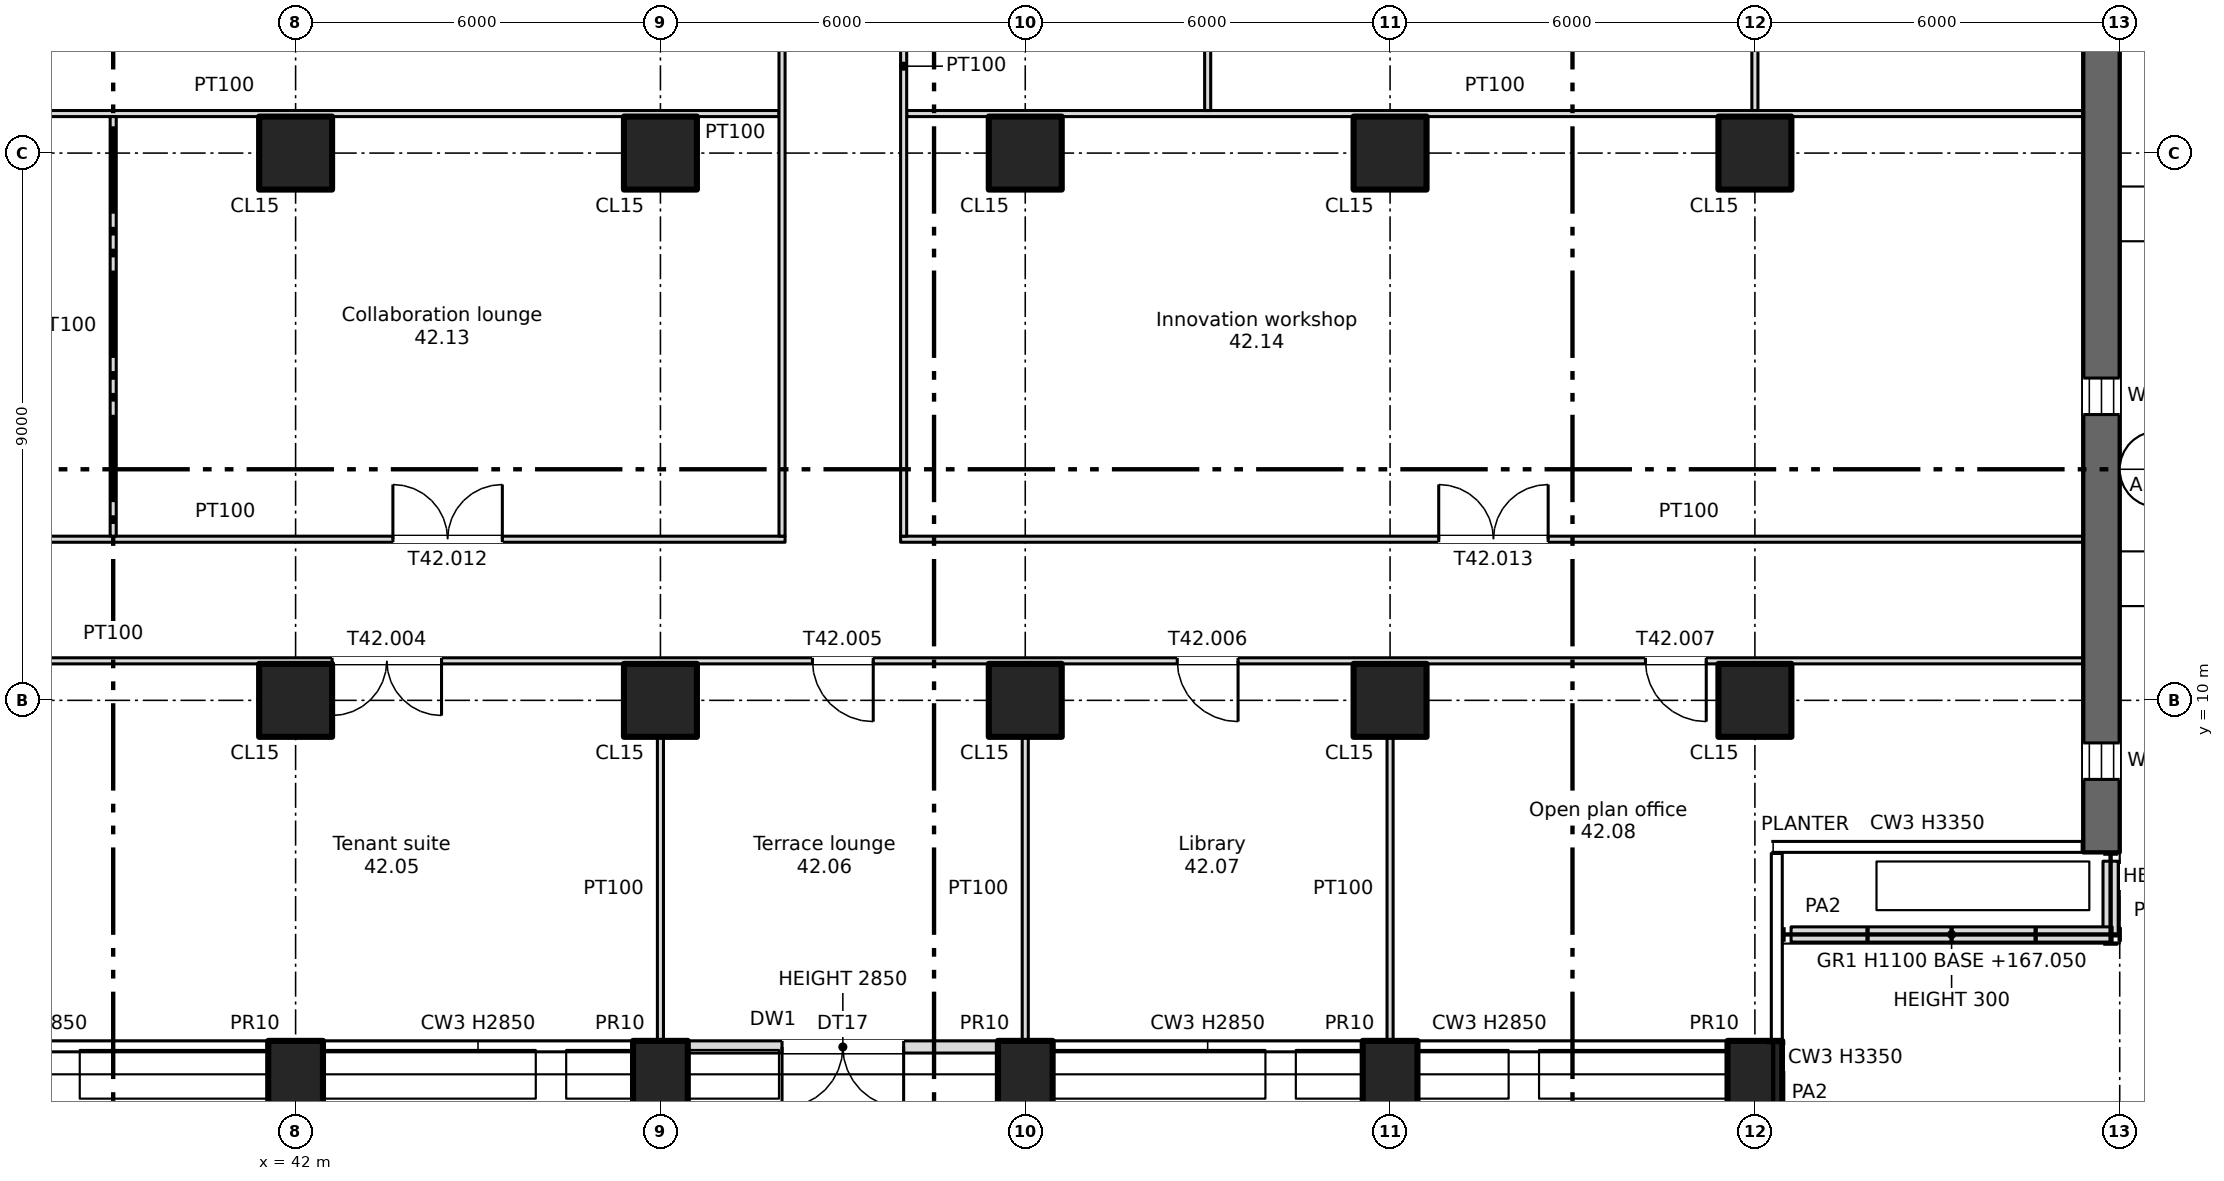
"""IFC4 building model, lengths in metres.
Left out: names, types, materials, properties, quantities, classifications, styles, units other than length and angle.
Written with IfcOpenShell. Run it as: python <this file> out.ifc"""

import sys

from ifc_helpers import new_model, si_unit, direction, frame, frame_2d, origin, origin_2d, place, context, subcontext, project, spatial, rectangle, extrude, element, fill, save


model = new_model("IFC4")
c1 = context("Model", 3, precision=1e-05, world=origin(), true_north=direction((0.0, 1.0)))
c2 = subcontext(c1, "Body", "Model", "MODEL_VIEW")
j1 = project(units=[si_unit("LENGTHUNIT", "METRE"), si_unit("PLANEANGLEUNIT", "RADIAN")], contexts=[c1])
p1 = place(None, origin())
s1 = spatial("IfcSite", under=j1, at=p1, CompositionType="ELEMENT")
p2 = place(p1, origin())
s2 = spatial("IfcBuilding", under=s1, at=p2, CompositionType="ELEMENT")
p3 = place(p2, frame((0.0, 0.0, 166.75)))
s3 = spatial("IfcBuildingStorey", under=s2, at=p3, CompositionType="ELEMENT", Elevation=166.75)
for number, where, z_axis, x_axis in (
    (1, (42.0, 3.7, 0.0), (0.0, 0.0, 1.0), (1.0, 0.0, 0.0)),
    (2, (48.0, 3.7, 0.0), (0.0, 0.0, 1.0), (1.0, 0.0, 0.0)),
    (3, (54.0, 3.7, 0.0), (0.0, 0.0, 1.0), (1.0, 0.0, 0.0)),
    (4, (60.0, 3.7, 0.0), (0.0, 0.0, 1.0), (1.0, 0.0, 0.0)),
    (5, (66.0, 3.7, 0.0), (0.0, 0.0, 1.0), (1.0, 0.0, 0.0)),
):
    element("IfcColumn", number, at=place(p3, frame(where, z_axis=z_axis, x_axis=x_axis)), inside=s3, PredefinedType="COLUMN", context=c2, shape_type="SweptSolid", body=[
        extrude(rectangle(XDim=0.9, YDim=1.4, at=origin_2d()), origin(), (0.0, 0.0, 1.0), 3.35),
    ])
for number, where, z_axis, x_axis in (
    (6, (42.0, 10.0, 0.0), (0.0, 0.0, 1.0), (1.0, 0.0, 0.0)),
    (7, (42.0, 19.0, 0.0), (0.0, 0.0, 1.0), (1.0, 0.0, 0.0)),
    (8, (48.0, 10.0, 0.0), (0.0, 0.0, 1.0), (1.0, 0.0, 0.0)),
    (9, (48.0, 19.0, 0.0), (0.0, 0.0, 1.0), (1.0, 0.0, 0.0)),
    (10, (54.0, 10.0, 0.0), (0.0, 0.0, 1.0), (1.0, 0.0, 0.0)),
    (11, (54.0, 19.0, 0.0), (0.0, 0.0, 1.0), (1.0, 0.0, 0.0)),
    (12, (60.0, 10.0, 0.0), (0.0, 0.0, 1.0), (1.0, 0.0, 0.0)),
    (13, (60.0, 19.0, 0.0), (0.0, 0.0, 1.0), (1.0, 0.0, 0.0)),
    (14, (66.0, 10.0, 0.0), (0.0, 0.0, 1.0), (1.0, 0.0, 0.0)),
    (15, (66.0, 19.0, 0.0), (0.0, 0.0, 1.0), (1.0, 0.0, 0.0)),
):
    element("IfcColumn", number, at=place(p3, frame(where, z_axis=z_axis, x_axis=x_axis)), inside=s3, PredefinedType="COLUMN", context=c2, shape_type="SweptSolid", body=[
        extrude(rectangle(XDim=1.2, YDim=1.2, at=origin_2d()), origin(), (0.0, 0.0, 1.0), 3.35),
    ])
p4 = place(p3, frame((71.7, 7.5, 0.0), z_axis=(0.0, 0.0, 1.0), x_axis=(0.0, 1.0, 0.0)))
e16 = element("IfcWall", 16, at=p4, inside=s3, PredefinedType="SHEAR", context=c2, shape_type="SweptSolid", body=[
    extrude(rectangle(XDim=34.0, YDim=0.6, at=frame_2d((17.0, 0.0))), origin(), (0.0, 0.0, 1.0), 3.35),
])
p5 = place(p4, frame((1.2, 0.0, 0.6)))
e17 = element("IfcOpeningElement", 17, at=p5, cuts=e16, PredefinedType="OPENING", context=c2, shape_type="SweptSolid", body=[
    extrude(rectangle(XDim=0.6, YDim=2.4, at=frame_2d((0.3, 1.2))), frame((0.0, 0.31, 0.0), z_axis=(0.0, -1.0, 0.0), x_axis=(1.0, 0.0, 0.0)), (0.0, 0.0, 1.0), 0.62),
])
p6 = place(p4, frame((7.2, 0.0, 0.6)))
e18 = element("IfcOpeningElement", 18, at=p6, cuts=e16, PredefinedType="OPENING", context=c2, shape_type="SweptSolid", body=[
    extrude(rectangle(XDim=0.6, YDim=2.4, at=frame_2d((0.3, 1.2))), frame((0.0, 0.31, 0.0), z_axis=(0.0, -1.0, 0.0), x_axis=(1.0, 0.0, 0.0)), (0.0, 0.0, 1.0), 0.62),
])
p7 = place(p4, frame((13.2, 0.0, 0.6)))
e19 = element("IfcOpeningElement", 19, at=p7, cuts=e16, PredefinedType="OPENING", context=c2, shape_type="SweptSolid", body=[
    extrude(rectangle(XDim=0.6, YDim=2.4, at=frame_2d((0.3, 1.2))), frame((0.0, 0.31, 0.0), z_axis=(0.0, -1.0, 0.0), x_axis=(1.0, 0.0, 0.0)), (0.0, 0.0, 1.0), 0.62),
])
p8 = place(p4, frame((19.2, 0.0, 0.6)))
e20 = element("IfcOpeningElement", 20, at=p8, cuts=e16, PredefinedType="OPENING", context=c2, shape_type="SweptSolid", body=[
    extrude(rectangle(XDim=0.6, YDim=2.4, at=frame_2d((0.3, 1.2))), frame((0.0, 0.31, 0.0), z_axis=(0.0, -1.0, 0.0), x_axis=(1.0, 0.0, 0.0)), (0.0, 0.0, 1.0), 0.62),
])
p9 = place(p4, frame((25.2, 0.0, 0.6)))
e21 = element("IfcOpeningElement", 21, at=p9, cuts=e16, PredefinedType="OPENING", context=c2, shape_type="SweptSolid", body=[
    extrude(rectangle(XDim=0.6, YDim=2.4, at=frame_2d((0.3, 1.2))), frame((0.0, 0.31, 0.0), z_axis=(0.0, -1.0, 0.0), x_axis=(1.0, 0.0, 0.0)), (0.0, 0.0, 1.0), 0.62),
])
p10 = place(p4, frame((31.2, 0.0, 0.6)))
e22 = element("IfcOpeningElement", 22, at=p10, cuts=e16, PredefinedType="OPENING", context=c2, shape_type="SweptSolid", body=[
    extrude(rectangle(XDim=0.6, YDim=2.4, at=frame_2d((0.3, 1.2))), frame((0.0, 0.31, 0.0), z_axis=(0.0, -1.0, 0.0), x_axis=(1.0, 0.0, 0.0)), (0.0, 0.0, 1.0), 0.62),
])
p11 = place(p3, frame((48.45, 4.3, 0.0), z_axis=(0.0, 0.0, 1.0), x_axis=(1.0, 0.0, 0.0)))
e23 = element("IfcWall", 23, at=p11, inside=s3, PredefinedType="SOLIDWALL", context=c2, shape_type="SweptSolid", body=[
    extrude(rectangle(XDim=5.1, YDim=0.2, at=frame_2d((2.55, 0.0))), origin(), (0.0, 0.0, 1.0), 2.85),
])
p12 = place(p11, frame((1.55, 0.0, 0.0)))
e24 = element("IfcOpeningElement", 24, at=p12, cuts=e23, PredefinedType="OPENING", context=c2, shape_type="SweptSolid", body=[
    extrude(rectangle(XDim=2.0, YDim=2.4, at=frame_2d((1.0, 1.2))), frame((0.0, 0.11, 0.0), z_axis=(0.0, -1.0, 0.0), x_axis=(1.0, 0.0, 0.0)), (0.0, 0.0, 1.0), 0.22),
])
p13 = place(p3, frame((71.85, 7.355, 0.0), z_axis=(0.0, 0.0, 1.0), x_axis=(0.0, -1.0, 0.0)))
e25 = element("IfcWall", 25, at=p13, inside=s3, PredefinedType="PARAPET", context=c2, shape_type="SweptSolid", body=[
    extrude(rectangle(XDim=1.23, YDim=0.25, at=frame_2d((0.615, 0.0))), origin(), (0.0, 0.0, 1.0), 0.3),
])
p14 = place(p3, frame((71.875, 6.15, 0.0), z_axis=(0.0, 0.0, 1.0), x_axis=(-1.0, 0.0, 0.0)))
e26 = element("IfcWall", 26, at=p14, inside=s3, PredefinedType="PARAPET", context=c2, shape_type="SweptSolid", body=[
    extrude(rectangle(XDim=5.28, YDim=0.25, at=frame_2d((2.64, 0.0))), origin(), (0.0, 0.0, 1.0), 0.3),
])
p15 = place(p3, frame((66.3, 4.255, 0.0), z_axis=(0.0, 0.0, 1.0), x_axis=(0.0, -1.0, 0.0)))
e27 = element("IfcWall", 27, at=p15, inside=s3, PredefinedType="PARAPET", context=c2, shape_type="SweptSolid", body=[
    extrude(rectangle(XDim=1.23, YDim=0.25, at=frame_2d((0.615, 0.0))), origin(), (0.0, 0.0, 1.0), 0.3),
])
p16 = place(p3, frame((6.6, 10.65, 0.0), z_axis=(0.0, 0.0, 1.0), x_axis=(1.0, 0.0, 0.0)))
e28 = element("IfcWall", 28, at=p16, inside=s3, PredefinedType="PARTITIONING", context=c2, shape_type="SweptSolid", body=[
    extrude(rectangle(XDim=64.8, YDim=0.1, at=frame_2d((32.4, 0.0))), origin(), (0.0, 0.0, 1.0), 3.35),
])
p17 = place(p16, frame((12.4, 0.0, 0.0)))
e29 = element("IfcOpeningElement", 29, at=p17, cuts=e28, PredefinedType="OPENING", context=c2, shape_type="SweptSolid", body=[
    extrude(rectangle(XDim=1.0, YDim=2.1, at=frame_2d((0.5, 1.05))), frame((0.0, 0.06, 0.0), z_axis=(0.0, -1.0, 0.0), x_axis=(1.0, 0.0, 0.0)), (0.0, 0.0, 1.0), 0.12),
])
p18 = place(p16, frame((19.9, 0.0, 0.0)))
e30 = element("IfcOpeningElement", 30, at=p18, cuts=e28, PredefinedType="OPENING", context=c2, shape_type="SweptSolid", body=[
    extrude(rectangle(XDim=1.0, YDim=2.1, at=frame_2d((0.5, 1.05))), frame((0.0, 0.06, 0.0), z_axis=(0.0, -1.0, 0.0), x_axis=(1.0, 0.0, 0.0)), (0.0, 0.0, 1.0), 0.12),
])
p19 = place(p16, frame((25.9, 0.0, 0.0)))
e31 = element("IfcOpeningElement", 31, at=p19, cuts=e28, PredefinedType="OPENING", context=c2, shape_type="SweptSolid", body=[
    extrude(rectangle(XDim=1.0, YDim=2.1, at=frame_2d((0.5, 1.05))), frame((0.0, 0.06, 0.0), z_axis=(0.0, -1.0, 0.0), x_axis=(1.0, 0.0, 0.0)), (0.0, 0.0, 1.0), 0.12),
])
p20 = place(p16, frame((36.0, 0.0, 0.0)))
e32 = element("IfcOpeningElement", 32, at=p20, cuts=e28, PredefinedType="OPENING", context=c2, shape_type="SweptSolid", body=[
    extrude(rectangle(XDim=1.8, YDim=2.1, at=frame_2d((0.9, 1.05))), frame((0.0, 0.06, 0.0), z_axis=(0.0, -1.0, 0.0), x_axis=(1.0, 0.0, 0.0)), (0.0, 0.0, 1.0), 0.12),
])
p21 = place(p16, frame((43.9, 0.0, 0.0)))
e33 = element("IfcOpeningElement", 33, at=p21, cuts=e28, PredefinedType="OPENING", context=c2, shape_type="SweptSolid", body=[
    extrude(rectangle(XDim=1.0, YDim=2.1, at=frame_2d((0.5, 1.05))), frame((0.0, 0.06, 0.0), z_axis=(0.0, -1.0, 0.0), x_axis=(1.0, 0.0, 0.0)), (0.0, 0.0, 1.0), 0.12),
])
p22 = place(p16, frame((49.9, 0.0, 0.0)))
e34 = element("IfcOpeningElement", 34, at=p22, cuts=e28, PredefinedType="OPENING", context=c2, shape_type="SweptSolid", body=[
    extrude(rectangle(XDim=1.0, YDim=2.1, at=frame_2d((0.5, 1.05))), frame((0.0, 0.06, 0.0), z_axis=(0.0, -1.0, 0.0), x_axis=(1.0, 0.0, 0.0)), (0.0, 0.0, 1.0), 0.12),
])
p23 = place(p16, frame((57.6, 0.0, 0.0)))
e35 = element("IfcOpeningElement", 35, at=p23, cuts=e28, PredefinedType="OPENING", context=c2, shape_type="SweptSolid", body=[
    extrude(rectangle(XDim=1.0, YDim=2.1, at=frame_2d((0.5, 1.05))), frame((0.0, 0.06, 0.0), z_axis=(0.0, -1.0, 0.0), x_axis=(1.0, 0.0, 0.0)), (0.0, 0.0, 1.0), 0.12),
])
p24 = place(p16, frame((6.15, 0.0, 0.0)))
e36 = element("IfcOpeningElement", 36, at=p24, cuts=e28, PredefinedType="OPENING", context=c2, shape_type="SweptSolid", body=[
    extrude(rectangle(XDim=1.0, YDim=2.1, at=frame_2d((0.5, 1.05))), frame((0.0, 0.06, 0.0), z_axis=(0.0, -1.0, 0.0), x_axis=(1.0, 0.0, 0.0)), (0.0, 0.0, 1.0), 0.12),
])
p25 = place(p3, frame((27.95, 12.65, 0.0), z_axis=(0.0, 0.0, 1.0), x_axis=(1.0, 0.0, 0.0)))
e37 = element("IfcWall", 37, at=p25, inside=s3, PredefinedType="PARTITIONING", context=c2, shape_type="SweptSolid", body=[
    extrude(rectangle(XDim=22.1, YDim=0.1, at=frame_2d((11.05, 0.0))), origin(), (0.0, 0.0, 1.0), 3.35),
])
p26 = place(p25, frame((4.65, 0.0, 0.0)))
e38 = element("IfcOpeningElement", 38, at=p26, cuts=e37, PredefinedType="OPENING", context=c2, shape_type="SweptSolid", body=[
    extrude(rectangle(XDim=1.8, YDim=2.1, at=frame_2d((0.9, 1.05))), frame((0.0, 0.06, 0.0), z_axis=(0.0, -1.0, 0.0), x_axis=(1.0, 0.0, 0.0)), (0.0, 0.0, 1.0), 0.12),
])
p27 = place(p25, frame((15.65, 0.0, 0.0)))
e39 = element("IfcOpeningElement", 39, at=p27, cuts=e37, PredefinedType="OPENING", context=c2, shape_type="SweptSolid", body=[
    extrude(rectangle(XDim=1.8, YDim=2.1, at=frame_2d((0.9, 1.05))), frame((0.0, 0.06, 0.0), z_axis=(0.0, -1.0, 0.0), x_axis=(1.0, 0.0, 0.0)), (0.0, 0.0, 1.0), 0.12),
])
p28 = place(p3, frame((51.95, 12.65, 0.0), z_axis=(0.0, 0.0, 1.0), x_axis=(1.0, 0.0, 0.0)))
e40 = element("IfcWall", 40, at=p28, inside=s3, PredefinedType="PARTITIONING", context=c2, shape_type="SweptSolid", body=[
    extrude(rectangle(XDim=19.45, YDim=0.1, at=frame_2d((9.725, 0.0))), origin(), (0.0, 0.0, 1.0), 3.35),
])
p29 = place(p28, frame((8.85, 0.0, 0.0)))
e41 = element("IfcOpeningElement", 41, at=p29, cuts=e40, PredefinedType="OPENING", context=c2, shape_type="SweptSolid", body=[
    extrude(rectangle(XDim=1.8, YDim=2.1, at=frame_2d((0.9, 1.05))), frame((0.0, 0.06, 0.0), z_axis=(0.0, -1.0, 0.0), x_axis=(1.0, 0.0, 0.0)), (0.0, 0.0, 1.0), 0.12),
])
p30 = place(p3, frame((28.05, 19.65, 0.0), z_axis=(0.0, 0.0, 1.0), x_axis=(1.0, 0.0, 0.0)))
e42 = element("IfcWall", 42, at=p30, inside=s3, PredefinedType="PARTITIONING", context=c2, shape_type="SweptSolid", body=[
    extrude(rectangle(XDim=21.9, YDim=0.1, at=frame_2d((10.95, 0.0))), origin(), (0.0, 0.0, 1.0), 3.35),
])
p31 = place(p3, frame((52.05, 19.65, 0.0), z_axis=(0.0, 0.0, 1.0), x_axis=(1.0, 0.0, 0.0)))
e43 = element("IfcWall", 43, at=p31, inside=s3, PredefinedType="PARTITIONING", context=c2, shape_type="SweptSolid", body=[
    extrude(rectangle(XDim=19.35, YDim=0.1, at=frame_2d((9.675, 0.0))), origin(), (0.0, 0.0, 1.0), 3.35),
])
p32 = place(p3, frame((39.0, 12.7, 0.0), z_axis=(0.0, 0.0, 1.0), x_axis=(0.0, 1.0, 0.0)))
e44 = element("IfcWall", 44, at=p32, inside=s3, PredefinedType="PARTITIONING", context=c2, shape_type="SweptSolid", body=[
    extrude(rectangle(XDim=6.9, YDim=0.1, at=frame_2d((3.45, 0.0))), origin(), (0.0, 0.0, 1.0), 3.35),
])
p33 = place(p3, frame((48.0, 4.4, 0.0), z_axis=(0.0, 0.0, 1.0), x_axis=(0.0, 1.0, 0.0)))
e45 = element("IfcWall", 45, at=p33, inside=s3, PredefinedType="PARTITIONING", context=c2, shape_type="SweptSolid", body=[
    extrude(rectangle(XDim=5.0, YDim=0.1, at=frame_2d((2.5, 0.0))), origin(), (0.0, 0.0, 1.0), 3.35),
])
p34 = place(p3, frame((50.0, 12.7, 0.0), z_axis=(0.0, 0.0, 1.0), x_axis=(0.0, 1.0, 0.0)))
e46 = element("IfcWall", 46, at=p34, inside=s3, PredefinedType="PARTITIONING", context=c2, shape_type="SweptSolid", body=[
    extrude(rectangle(XDim=13.25, YDim=0.1, at=frame_2d((6.625, 0.0))), origin(), (0.0, 0.0, 1.0), 3.35),
])
p35 = place(p3, frame((52.0, 12.7, 0.0), z_axis=(0.0, 0.0, 1.0), x_axis=(0.0, 1.0, 0.0)))
e47 = element("IfcWall", 47, at=p35, inside=s3, PredefinedType="PARTITIONING", context=c2, shape_type="SweptSolid", body=[
    extrude(rectangle(XDim=13.25, YDim=0.1, at=frame_2d((6.625, 0.0))), origin(), (0.0, 0.0, 1.0), 3.35),
])
p36 = place(p35, frame((9.625, 0.0, 0.0)))
e48 = element("IfcOpeningElement", 48, at=p36, cuts=e47, PredefinedType="OPENING", context=c2, shape_type="SweptSolid", body=[
    extrude(rectangle(XDim=1.0, YDim=2.1, at=frame_2d((0.5, 1.05))), frame((0.0, 0.06, 0.0), z_axis=(0.0, -1.0, 0.0), x_axis=(1.0, 0.0, 0.0)), (0.0, 0.0, 1.0), 0.12),
])
p37 = place(p3, frame((54.0, 4.4, 0.0), z_axis=(0.0, 0.0, 1.0), x_axis=(0.0, 1.0, 0.0)))
e49 = element("IfcWall", 49, at=p37, inside=s3, PredefinedType="PARTITIONING", context=c2, shape_type="SweptSolid", body=[
    extrude(rectangle(XDim=5.0, YDim=0.1, at=frame_2d((2.5, 0.0))), origin(), (0.0, 0.0, 1.0), 3.35),
])
p38 = place(p3, frame((57.0, 19.7, 0.0), z_axis=(0.0, 0.0, 1.0), x_axis=(0.0, 1.0, 0.0)))
e50 = element("IfcWall", 50, at=p38, inside=s3, PredefinedType="PARTITIONING", context=c2, shape_type="SweptSolid", body=[
    extrude(rectangle(XDim=6.25, YDim=0.1, at=frame_2d((3.125, 0.0))), origin(), (0.0, 0.0, 1.0), 3.35),
])
p39 = place(p3, frame((60.0, 4.4, 0.0), z_axis=(0.0, 0.0, 1.0), x_axis=(0.0, 1.0, 0.0)))
e51 = element("IfcWall", 51, at=p39, inside=s3, PredefinedType="PARTITIONING", context=c2, shape_type="SweptSolid", body=[
    extrude(rectangle(XDim=5.0, YDim=0.1, at=frame_2d((2.5, 0.0))), origin(), (0.0, 0.0, 1.0), 3.35),
])
p40 = place(p3, frame((66.0, 19.7, 0.0), z_axis=(0.0, 0.0, 1.0), x_axis=(0.0, 1.0, 0.0)))
e52 = element("IfcWall", 52, at=p40, inside=s3, PredefinedType="PARTITIONING", context=c2, shape_type="SweptSolid", body=[
    extrude(rectangle(XDim=6.25, YDim=0.1, at=frame_2d((3.125, 0.0))), origin(), (0.0, 0.0, 1.0), 3.35),
])
p41 = place(p5, origin())
e53 = element("IfcWindow", 53, at=p41, inside=s3, PartitioningType="SINGLE_PANEL", PredefinedType="WINDOW", context=c2, shape_type="SweptSolid", body=[
    extrude(rectangle(XDim=0.6, YDim=2.4, at=frame_2d((0.3, 1.2))), frame((0.0, 0.03, 0.0), z_axis=(0.0, -1.0, 0.0), x_axis=(1.0, 0.0, 0.0)), (0.0, 0.0, 1.0), 0.06),
])
fill(e17, e53)
p42 = place(p6, origin())
e54 = element("IfcWindow", 54, at=p42, inside=s3, PartitioningType="SINGLE_PANEL", PredefinedType="WINDOW", context=c2, shape_type="SweptSolid", body=[
    extrude(rectangle(XDim=0.6, YDim=2.4, at=frame_2d((0.3, 1.2))), frame((0.0, 0.03, 0.0), z_axis=(0.0, -1.0, 0.0), x_axis=(1.0, 0.0, 0.0)), (0.0, 0.0, 1.0), 0.06),
])
fill(e18, e54)
p43 = place(p12, frame((2.0, 0.0, 0.0), z_axis=(0.0, 0.0, 1.0), x_axis=(-1.0, 0.0, 0.0)))
e55 = element("IfcDoor", 55, at=p43, inside=s3, OperationType="DOUBLE_DOOR_SINGLE_SWING", PredefinedType="DOOR", context=c2, shape_type="SweptSolid", body=[
    extrude(rectangle(XDim=2.0, YDim=2.4, at=frame_2d((1.0, 1.2))), frame((0.0, 0.025, 0.0), z_axis=(0.0, -1.0, 0.0), x_axis=(1.0, 0.0, 0.0)), (0.0, 0.0, 1.0), 0.05),
])
fill(e24, e55)
p44 = place(p20, origin())
e56 = element("IfcDoor", 56, at=p44, inside=s3, OperationType="DOUBLE_DOOR_SINGLE_SWING", PredefinedType="DOOR", context=c2, shape_type="SweptSolid", body=[
    extrude(rectangle(XDim=1.8, YDim=2.1, at=frame_2d((0.9, 1.05))), frame((0.0, 0.025, 0.0), z_axis=(0.0, -1.0, 0.0), x_axis=(1.0, 0.0, 0.0)), (0.0, 0.0, 1.0), 0.05),
])
fill(e32, e56)
p45 = place(p21, origin())
e57 = element("IfcDoor", 57, at=p45, inside=s3, OperationType="SINGLE_SWING_RIGHT", PredefinedType="DOOR", context=c2, shape_type="SweptSolid", body=[
    extrude(rectangle(XDim=1.0, YDim=2.1, at=frame_2d((0.5, 1.05))), frame((0.0, 0.025, 0.0), z_axis=(0.0, -1.0, 0.0), x_axis=(1.0, 0.0, 0.0)), (0.0, 0.0, 1.0), 0.05),
])
fill(e33, e57)
p46 = place(p22, origin())
e58 = element("IfcDoor", 58, at=p46, inside=s3, OperationType="SINGLE_SWING_RIGHT", PredefinedType="DOOR", context=c2, shape_type="SweptSolid", body=[
    extrude(rectangle(XDim=1.0, YDim=2.1, at=frame_2d((0.5, 1.05))), frame((0.0, 0.025, 0.0), z_axis=(0.0, -1.0, 0.0), x_axis=(1.0, 0.0, 0.0)), (0.0, 0.0, 1.0), 0.05),
])
fill(e34, e58)
p47 = place(p23, origin())
e59 = element("IfcDoor", 59, at=p47, inside=s3, OperationType="SINGLE_SWING_RIGHT", PredefinedType="DOOR", context=c2, shape_type="SweptSolid", body=[
    extrude(rectangle(XDim=1.0, YDim=2.1, at=frame_2d((0.5, 1.05))), frame((0.0, 0.025, 0.0), z_axis=(0.0, -1.0, 0.0), x_axis=(1.0, 0.0, 0.0)), (0.0, 0.0, 1.0), 0.05),
])
fill(e35, e59)
p48 = place(p27, origin())
e60 = element("IfcDoor", 60, at=p48, inside=s3, OperationType="DOUBLE_DOOR_SINGLE_SWING", PredefinedType="DOOR", context=c2, shape_type="SweptSolid", body=[
    extrude(rectangle(XDim=1.8, YDim=2.1, at=frame_2d((0.9, 1.05))), frame((0.0, 0.025, 0.0), z_axis=(0.0, -1.0, 0.0), x_axis=(1.0, 0.0, 0.0)), (0.0, 0.0, 1.0), 0.05),
])
fill(e39, e60)
p49 = place(p29, origin())
e61 = element("IfcDoor", 61, at=p49, inside=s3, OperationType="DOUBLE_DOOR_SINGLE_SWING", PredefinedType="DOOR", context=c2, shape_type="SweptSolid", body=[
    extrude(rectangle(XDim=1.8, YDim=2.1, at=frame_2d((0.9, 1.05))), frame((0.0, 0.025, 0.0), z_axis=(0.0, -1.0, 0.0), x_axis=(1.0, 0.0, 0.0)), (0.0, 0.0, 1.0), 0.05),
])
fill(e41, e61)
save(model, sys.argv[1])
